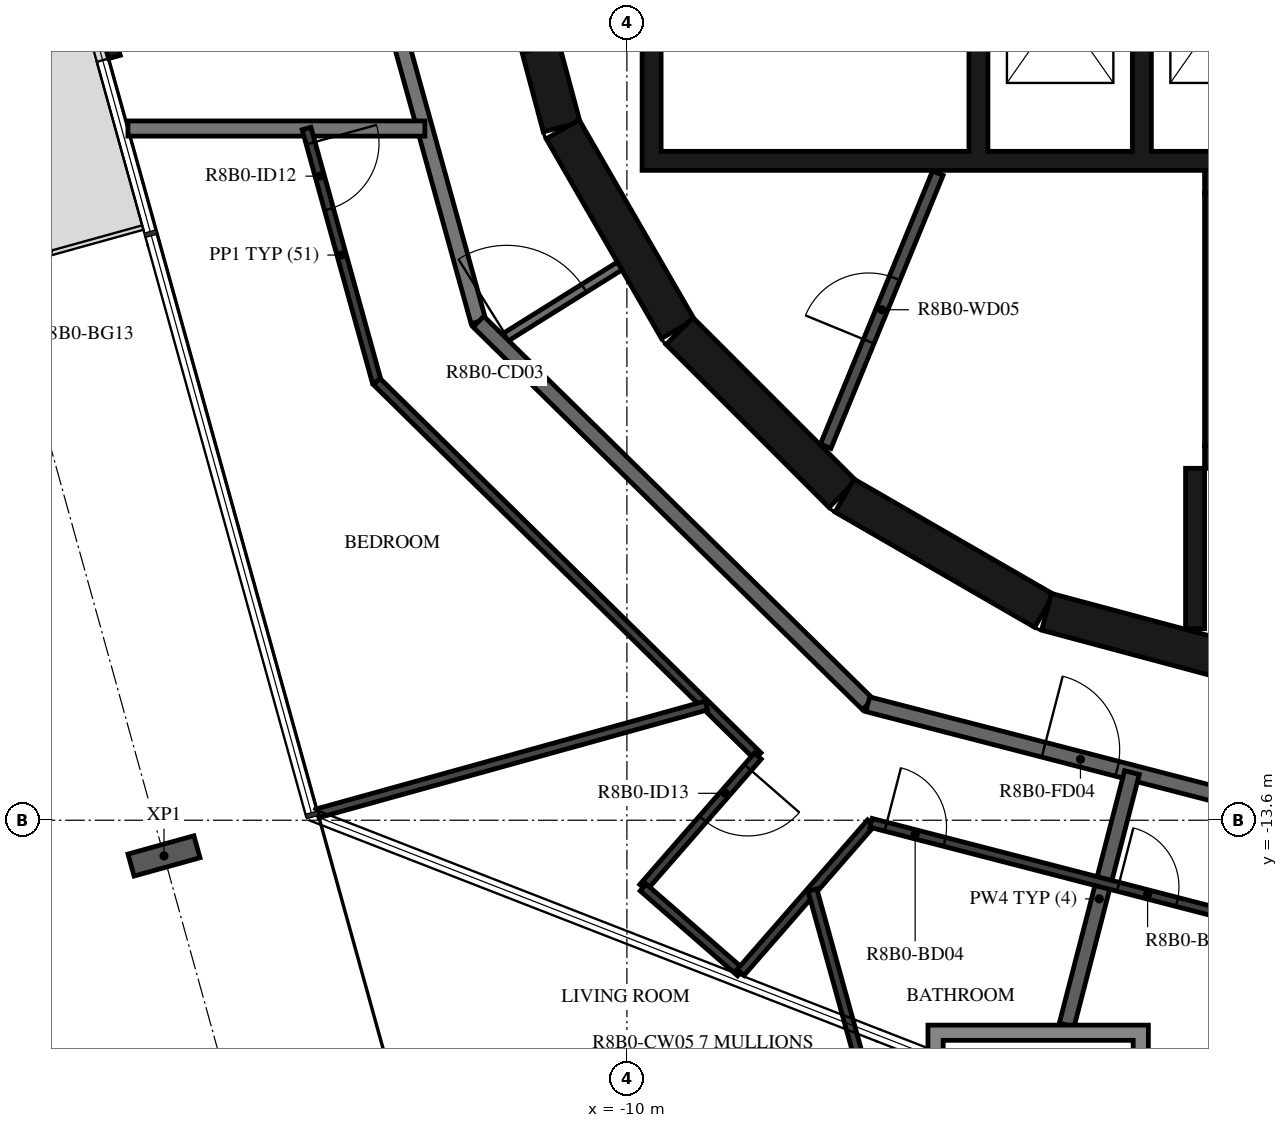
"""IFC4 building model, lengths in metres.
Left out: names, types, materials, properties, quantities, classifications, styles, units other than length and angle.
Written with IfcOpenShell. Run it as: python <this file> out.ifc"""

import sys

from ifc_helpers import new_model, si_unit, direction, frame, frame_2d, origin, origin_2d, place, context, subcontext, project, spatial, polyline, rectangle, i_section, outline, extrude, element, fill, save


model = new_model("IFC4")
c1 = context("Model", 3, precision=1e-05, world=origin(), true_north=direction((0.0, 1.0)))
c2 = subcontext(c1, "Body", "Model", "MODEL_VIEW")
j1 = project(units=[si_unit("LENGTHUNIT", "METRE"), si_unit("PLANEANGLEUNIT", "RADIAN")], contexts=[c1])
p1 = place(None, origin())
s1 = spatial("IfcSite", under=j1, at=p1, CompositionType="ELEMENT")
p2 = place(p1, origin())
s2 = spatial("IfcBuilding", under=s1, at=p2, CompositionType="ELEMENT")
p3 = place(p2, frame((0.0, 0.0, 312.2)))
s3 = spatial("IfcBuildingStorey", under=s2, at=p3, CompositionType="ELEMENT", Elevation=312.2)
p4 = place(p3, frame((-16.09, -14.069, -0.38), z_axis=(0.0, 0.0, 1.0), x_axis=(-0.267238143562, 0.963630517691, 0.0)))
e1 = element("IfcColumn", 1, at=p4, inside=s3, PredefinedType="COLUMN", context=c2, shape_type="SweptSolid", body=[
    extrude(i_section(OverallWidth=0.3, OverallDepth=0.9, WebThickness=0.019, FlangeThickness=0.035, FilletRadius=0.03, at=origin_2d()), origin(), (0.0, 0.0, 1.0), 3.5),
])
p5 = place(p3, frame((-17.598, -0.475, 0.0), z_axis=(0.0, 0.0, 1.0), x_axis=(0.267266077957, -0.963622770369, 0.0)))
e2 = element("IfcWall", 2, at=p5, inside=s3, PredefinedType="STANDARD", context=c2, shape_type="SweptSolid", body=[
    extrude(rectangle(XDim=3.2, YDim=0.16, at=frame_2d((1.6, 0.0))), origin(), (0.0, 0.0, 1.0), 3.12),
])
p6 = place(p5, frame((0.4, 0.0, 0.0)))
e3 = element("IfcOpeningElement", 3, at=p6, cuts=e2, PredefinedType="OPENING", context=c2, shape_type="SweptSolid", body=[
    extrude(rectangle(XDim=2.4, YDim=2.4, at=frame_2d((1.2, 1.2))), frame((0.0, 0.09, 0.0), z_axis=(0.0, -1.0, 0.0), x_axis=(1.0, 0.0, 0.0)), (0.0, 0.0, 1.0), 0.18),
])
p7 = place(p3, frame((-11.643, -1.55, 0.0), z_axis=(0.0, 0.0, 1.0), x_axis=(0.258734743916, -0.965948410781, 0.0)))
e4 = element("IfcWall", 4, at=p7, inside=s3, PredefinedType="SHEAR", context=c2, shape_type="SweptSolid", body=[
    extrude(rectangle(XDim=3.033, YDim=0.5, at=frame_2d((1.516, 0.0))), origin(), (0.0, 0.0, 1.0), 3.12),
])
p8 = place(p7, frame((1.066, 0.0, 0.0)))
e5 = element("IfcOpeningElement", 5, at=p8, cuts=e4, PredefinedType="OPENING", context=c2, shape_type="SweptSolid", body=[
    extrude(rectangle(XDim=0.9, YDim=2.1, at=frame_2d((0.45, 1.05))), frame((0.0, 0.26, 0.0), z_axis=(0.0, -1.0, 0.0), x_axis=(1.0, 0.0, 0.0)), (0.0, 0.0, 1.0), 0.52),
])
p9 = place(p3, frame((-10.845, -4.51, 0.0), z_axis=(0.0, 0.0, 1.0), x_axis=(0.500087131594, -0.865975092491, 0.0)))
e6 = element("IfcWall", 6, at=p9, inside=s3, PredefinedType="SHEAR", context=c2, shape_type="SweptSolid", body=[
    extrude(rectangle(XDim=3.033, YDim=0.5, at=frame_2d((1.516, 0.0))), origin(), (0.0, 0.0, 1.0), 3.12),
])
p10 = place(p3, frame((-9.308, -7.164, 0.0), z_axis=(0.0, 0.0, 1.0), x_axis=(0.707106781187, -0.707106781187, 0.0)))
e7 = element("IfcWall", 7, at=p10, inside=s3, PredefinedType="SHEAR", context=c2, shape_type="SweptSolid", body=[
    extrude(rectangle(XDim=3.032, YDim=0.5, at=frame_2d((1.516, 0.0))), origin(), (0.0, 0.0, 1.0), 3.12),
])
for number, where, z_axis, x_axis in (
    (8, (-7.137, -9.329, 0.0), (0.0, 0.0, 1.0), (0.866, -0.5, 0.0)),
    (9, (-4.479, -10.858, 0.0), (0.0, 0.0, 1.0), (0.966, -0.259, 0.0)),
):
    element("IfcWall", number, at=place(p3, frame(where, z_axis=z_axis, x_axis=x_axis)), inside=s3, PredefinedType="SHEAR", context=c2, shape_type="SweptSolid", body=[
        extrude(rectangle(XDim=3.033, YDim=0.5, at=frame_2d((1.516, 0.0))), origin(), (0.0, 0.0, 1.0), 3.12),
    ])
p11 = place(p3, frame((-2.275, -8.67, 0.0), z_axis=(0.0, 0.0, 1.0), x_axis=(0.0, 1.0, 0.0)))
e10 = element("IfcWall", 10, at=p11, inside=s3, PredefinedType="SHEAR", context=c2, shape_type="SweptSolid", body=[
    extrude(rectangle(XDim=3.32, YDim=0.25, at=frame_2d((1.66, 0.0))), origin(), (0.0, 0.0, 1.0), 3.12),
])
p12 = place(p3, frame((-2.4, -5.2, 0.0), z_axis=(0.0, 0.0, 1.0), x_axis=(1.0, 0.0, 0.0)))
e11 = element("IfcWall", 11, at=p12, inside=s3, PredefinedType="SHEAR", context=c2, shape_type="SweptSolid", body=[
    extrude(rectangle(XDim=7.05, YDim=0.3, at=frame_2d((3.525, 0.0))), origin(), (0.0, 0.0, 1.0), 3.12),
])
p13 = place(p3, frame((-2.4, -8.82, 0.0), z_axis=(0.0, 0.0, 1.0), x_axis=(1.0, 0.0, 0.0)))
e12 = element("IfcWall", 12, at=p13, inside=s3, PredefinedType="SHEAR", context=c2, shape_type="SweptSolid", body=[
    extrude(rectangle(XDim=2.5, YDim=0.3, at=frame_2d((1.25, 0.0))), origin(), (0.0, 0.0, 1.0), 3.12),
])
p14 = place(p13, frame((0.65, 0.0, 0.0)))
e13 = element("IfcOpeningElement", 13, at=p14, cuts=e12, PredefinedType="OPENING", context=c2, shape_type="SweptSolid", body=[
    extrude(rectangle(XDim=1.2, YDim=2.1, at=frame_2d((0.6, 1.05))), frame((0.0, 0.16, 0.0), z_axis=(0.0, -1.0, 0.0), x_axis=(1.0, 0.0, 0.0)), (0.0, 0.0, 1.0), 0.32),
])
p15 = place(p3, frame((-2.525, -8.97, 0.0), z_axis=(0.0, 0.0, 1.0), x_axis=(0.0, -1.0, 0.0)))
e14 = element("IfcWall", 14, at=p15, inside=s3, PredefinedType="SHEAR", context=c2, shape_type="SweptSolid", body=[
    extrude(rectangle(XDim=2.11, YDim=0.25, at=frame_2d((1.055, 0.0))), origin(), (0.0, 0.0, 1.0), 3.12),
])
p16 = place(p3, origin())
e15 = element("IfcWall", 15, at=p16, inside=s3, PredefinedType="SHEAR", context=c2, shape_type="SweptSolid", body=[
    extrude(outline(polyline([(9.8, -5.05), (9.8, -4.8), (9.8, -1.9), (9.55, -1.9), (9.55, -4.8), (7.65, -4.8), (7.65, -1.9), (7.4, -1.9), (7.4, -4.8), (5.5, -4.8), (5.5, -1.9), (5.25, -1.9), (5.25, -4.8), (3.35, -4.8), (3.35, -1.9), (3.1, -1.9), (3.1, -4.8), (1.2, -4.8), (1.2, -1.9), (0.95, -1.9), (0.95, -4.8), (-0.95, -4.8), (-0.95, -1.9), (-1.2, -1.9), (-1.2, -4.8), (-3.1, -4.8), (-3.1, -1.9), (-3.35, -1.9), (-3.35, -4.8), (-5.25, -4.8), (-5.25, -1.9), (-5.5, -1.9), (-5.5, -4.8), (-9.55, -4.8), (-9.55, -1.9), (-9.8, -1.9), (-9.8, -4.8), (-9.8, -5.05), (9.8, -5.05)])), origin(), (0.0, 0.0, 1.0), 3.12),
])
p17 = place(p3, frame((-7.385, -8.681, 0.0), z_axis=(0.0, 0.0, 1.0), x_axis=(0.379804590409, 0.925066739811, 0.0)))
e16 = element("IfcWall", 16, at=p17, inside=s3, PredefinedType="PARTITIONING", context=c2, shape_type="SweptSolid", body=[
    extrude(rectangle(XDim=3.885, YDim=0.15, at=frame_2d((1.942, 0.0))), origin(), (0.0, 0.0, 1.0), 3.12),
])
p18 = place(p17, frame((1.493, 0.0, 0.0)))
e17 = element("IfcOpeningElement", 17, at=p18, cuts=e16, PredefinedType="OPENING", context=c2, shape_type="SweptSolid", body=[
    extrude(rectangle(XDim=0.9, YDim=2.1, at=frame_2d((0.45, 1.05))), frame((0.0, 0.085, 0.0), z_axis=(0.0, -1.0, 0.0), x_axis=(1.0, 0.0, 0.0)), (0.0, 0.0, 1.0), 0.17),
])
p19 = place(p3, frame((-11.687, -7.303, 0.0), z_axis=(0.0, 0.0, 1.0), x_axis=(0.848064094072, 0.529893661357, 0.0)))
e18 = element("IfcWall", 18, at=p19, inside=s3, PredefinedType="PARTITIONING", context=c2, shape_type="SweptSolid", body=[
    extrude(rectangle(XDim=1.876, YDim=0.12, at=frame_2d((0.938, 0.0))), origin(), (0.0, 0.0, 1.0), 3.12),
])
p20 = place(p19, frame((0.125, 0.0, 0.0)))
e19 = element("IfcOpeningElement", 19, at=p20, cuts=e18, PredefinedType="OPENING", context=c2, shape_type="SweptSolid", body=[
    extrude(rectangle(XDim=1.2, YDim=2.1, at=frame_2d((0.6, 1.05))), frame((0.0, 0.07, 0.0), z_axis=(0.0, -1.0, 0.0), x_axis=(1.0, 0.0, 0.0)), (0.0, 0.0, 1.0), 0.14),
])
p21 = place(p3, frame((-13.872, -0.121, 0.0), z_axis=(0.0, 0.0, 1.0), x_axis=(0.267254575108, -0.963625960674, 0.0)))
e20 = element("IfcWall", 20, at=p21, inside=s3, PredefinedType="STANDARD", context=c2, shape_type="SweptSolid", body=[
    extrude(rectangle(XDim=7.181, YDim=0.2, at=frame_2d((3.591, 0.0))), origin(), (0.0, 0.0, 1.0), 3.12),
])
p22 = place(p3, frame((-11.953, -7.041, 0.0), z_axis=(0.0, 0.0, 1.0), x_axis=(0.713250549143, -0.70090916255, 0.0)))
e21 = element("IfcWall", 21, at=p22, inside=s3, PredefinedType="STANDARD", context=c2, shape_type="SweptSolid", body=[
    extrude(rectangle(XDim=7.181, YDim=0.2, at=frame_2d((3.59, 0.0))), origin(), (0.0, 0.0, 1.0), 3.12),
])
p23 = place(p3, frame((-6.831, -12.074, 0.0), z_axis=(0.0, 0.0, 1.0), x_axis=(0.968144780225, -0.250391063186, 0.0)))
e22 = element("IfcWall", 22, at=p23, inside=s3, PredefinedType="STANDARD", context=c2, shape_type="SweptSolid", body=[
    extrude(rectangle(XDim=7.181, YDim=0.2, at=frame_2d((3.591, 0.0))), origin(), (0.0, 0.0, 1.0), 3.12),
])
p24 = place(p23, frame((2.39, 0.0, 0.0)))
e23 = element("IfcOpeningElement", 23, at=p24, cuts=e22, PredefinedType="OPENING", context=c2, shape_type="SweptSolid", body=[
    extrude(rectangle(XDim=1.0, YDim=2.1, at=frame_2d((0.5, 1.05))), frame((0.0, 0.11, 0.0), z_axis=(0.0, -1.0, 0.0), x_axis=(1.0, 0.0, 0.0)), (0.0, 0.0, 1.0), 0.22),
])
p25 = place(p23, frame((5.69, 0.0, 0.0)))
e24 = element("IfcOpeningElement", 24, at=p25, cuts=e22, PredefinedType="OPENING", context=c2, shape_type="SweptSolid", body=[
    extrude(rectangle(XDim=1.0, YDim=2.1, at=frame_2d((0.5, 1.05))), frame((0.0, 0.11, 0.0), z_axis=(0.0, -1.0, 0.0), x_axis=(1.0, 0.0, 0.0)), (0.0, 0.0, 1.0), 0.22),
])
p26 = place(p3, frame((-16.564, -4.5, 0.0), z_axis=(0.0, 0.0, 1.0), x_axis=(1.0, 0.0, 0.0)))
e25 = element("IfcWall", 25, at=p26, inside=s3, PredefinedType="STANDARD", context=c2, shape_type="SweptSolid", body=[
    extrude(rectangle(XDim=3.907, YDim=0.2, at=frame_2d((1.953, 0.0))), origin(), (0.0, 0.0, 1.0), 3.12),
])
p27 = place(p3, frame((-4.214, -16.295, 0.0), z_axis=(0.0, 0.0, 1.0), x_axis=(0.250428810918, 0.968135016752, 0.0)))
e26 = element("IfcWall", 26, at=p27, inside=s3, PredefinedType="STANDARD", context=c2, shape_type="SweptSolid", body=[
    extrude(rectangle(XDim=3.432, YDim=0.2, at=frame_2d((1.716, 0.0))), origin(), (0.0, 0.0, 1.0), 3.12),
])
p28 = place(p3, frame((-14.214, -4.5, 0.0), z_axis=(0.0, 0.0, 1.0), x_axis=(0.267199167841, -0.963641325756, 0.0)))
e27 = element("IfcWall", 27, at=p28, inside=s3, PredefinedType="PARTITIONING", context=c2, shape_type="SweptSolid", body=[
    extrude(rectangle(XDim=3.455, YDim=0.12, at=frame_2d((1.727, 0.0))), origin(), (0.0, 0.0, 1.0), 3.12),
])
p29 = place(p28, frame((0.2, 0.0, 0.0)))
e28 = element("IfcOpeningElement", 28, at=p29, cuts=e27, PredefinedType="OPENING", context=c2, shape_type="SweptSolid", body=[
    extrude(rectangle(XDim=0.9, YDim=2.1, at=frame_2d((0.45, 1.05))), frame((0.0, 0.07, 0.0), z_axis=(0.0, -1.0, 0.0), x_axis=(1.0, 0.0, 0.0)), (0.0, 0.0, 1.0), 0.14),
])
p30 = place(p3, frame((-13.291, -7.829, 0.0), z_axis=(0.0, 0.0, 1.0), x_axis=(0.71326209988, -0.700897408238, 0.0)))
e29 = element("IfcWall", 29, at=p30, inside=s3, PredefinedType="PARTITIONING", context=c2, shape_type="SweptSolid", body=[
    extrude(rectangle(XDim=7.029, YDim=0.12, at=frame_2d((3.515, 0.0))), origin(), (0.0, 0.0, 1.0), 3.12),
])
p31 = place(p3, frame((-8.278, -12.756, 0.0), z_axis=(0.0, 0.0, 1.0), x_axis=(-0.657358463875, -0.753578031774, 0.0)))
e30 = element("IfcWall", 30, at=p31, inside=s3, PredefinedType="PARTITIONING", context=c2, shape_type="SweptSolid", body=[
    extrude(rectangle(XDim=2.294, YDim=0.12, at=frame_2d((1.147, 0.0))), origin(), (0.0, 0.0, 1.0), 3.12),
])
p32 = place(p31, frame((0.2, 0.0, 0.0)))
e31 = element("IfcOpeningElement", 31, at=p32, cuts=e30, PredefinedType="OPENING", context=c2, shape_type="SweptSolid", body=[
    extrude(rectangle(XDim=0.9, YDim=2.1, at=frame_2d((0.45, 1.05))), frame((0.0, 0.07, 0.0), z_axis=(0.0, -1.0, 0.0), x_axis=(1.0, 0.0, 0.0)), (0.0, 0.0, 1.0), 0.14),
])
p33 = place(p3, frame((-9.785, -14.484, 0.0), z_axis=(0.0, 0.0, 1.0), x_axis=(0.753643217927, -0.657283728745, 0.0)))
e32 = element("IfcWall", 32, at=p33, inside=s3, PredefinedType="PARTITIONING", context=c2, shape_type="SweptSolid", body=[
    extrude(rectangle(XDim=1.7, YDim=0.12, at=frame_2d((0.85, 0.0))), origin(), (0.0, 0.0, 1.0), 3.12),
])
p34 = place(p3, frame((-8.504, -15.602, 0.0), z_axis=(0.0, 0.0, 1.0), x_axis=(0.657298689015, 0.753630170189, 0.0)))
e33 = element("IfcWall", 33, at=p34, inside=s3, PredefinedType="PARTITIONING", context=c2, shape_type="SweptSolid", body=[
    extrude(rectangle(XDim=2.61, YDim=0.12, at=frame_2d((1.305, 0.0))), origin(), (0.0, 0.0, 1.0), 3.12),
])
p35 = place(p3, frame((-6.788, -13.635, 0.0), z_axis=(0.0, 0.0, 1.0), x_axis=(0.968142345176, -0.250400478189, 0.0)))
e34 = element("IfcWall", 34, at=p35, inside=s3, PredefinedType="PARTITIONING", context=c2, shape_type="SweptSolid", body=[
    extrude(rectangle(XDim=7.151, YDim=0.12, at=frame_2d((3.575, 0.0))), origin(), (0.0, 0.0, 1.0), 3.12),
])
p36 = place(p35, frame((0.2, 0.0, 0.0)))
e35 = element("IfcOpeningElement", 35, at=p36, cuts=e34, PredefinedType="OPENING", context=c2, shape_type="SweptSolid", body=[
    extrude(rectangle(XDim=0.8, YDim=2.1, at=frame_2d((0.4, 1.05))), frame((0.0, 0.07, 0.0), z_axis=(0.0, -1.0, 0.0), x_axis=(1.0, 0.0, 0.0)), (0.0, 0.0, 1.0), 0.14),
])
p37 = place(p35, frame((3.358, 0.0, 0.0)))
e36 = element("IfcOpeningElement", 36, at=p37, cuts=e34, PredefinedType="OPENING", context=c2, shape_type="SweptSolid", body=[
    extrude(rectangle(XDim=0.8, YDim=2.1, at=frame_2d((0.4, 1.05))), frame((0.0, 0.07, 0.0), z_axis=(0.0, -1.0, 0.0), x_axis=(1.0, 0.0, 0.0)), (0.0, 0.0, 1.0), 0.14),
])
p38 = place(p3, frame((-14.066, -13.508, 0.0), z_axis=(0.0, 0.0, 1.0), x_axis=(0.963634530082, 0.267223674913, 0.0)))
e37 = element("IfcWall", 37, at=p38, inside=s3, PredefinedType="PARTITIONING", context=c2, shape_type="SweptSolid", body=[
    extrude(rectangle(XDim=5.304, YDim=0.12, at=frame_2d((2.652, 0.0))), origin(), (0.0, 0.0, 1.0), 2.73),
])
p39 = place(p3, frame((-6.61, -17.943, 0.0), z_axis=(0.0, 0.0, 1.0), x_axis=(-0.267254066434, 0.96362610175, 0.0)))
e38 = element("IfcWall", 38, at=p39, inside=s3, PredefinedType="PARTITIONING", context=c2, shape_type="SweptSolid", body=[
    extrude(rectangle(XDim=3.553, YDim=0.12, at=frame_2d((1.777, 0.0))), origin(), (0.0, 0.0, 1.0), 3.12),
])
p40 = place(p3, frame((-2.918, -18.898, 0.0), z_axis=(0.0, 0.0, 1.0), x_axis=(0.700881606707, 0.713277627141, 0.0)))
e39 = element("IfcWall", 39, at=p40, inside=s3, PredefinedType="PARTITIONING", context=c2, shape_type="SweptSolid", body=[
    extrude(rectangle(XDim=5.062, YDim=0.12, at=frame_2d((2.531, 0.0))), origin(), (0.0, 0.0, 1.0), 3.12),
])
p41 = place(p3, origin())
e40 = element("IfcWall", 40, at=p41, inside=s3, PredefinedType="STANDARD", context=c2, shape_type="SweptSolid", body=[
    extrude(outline(polyline([(-3.139, -16.295), (-3.139, -19.195), (-6.039, -19.195), (-6.039, -16.295), (-3.139, -16.295)]), holes=[polyline([(-5.839, -18.995), (-3.339, -18.995), (-3.339, -16.495), (-5.839, -16.495), (-5.839, -18.995)])]), origin(), (0.0, 0.0, 1.0), 3.12),
])
p42 = place(p18, origin())
e41 = element("IfcDoor", 41, at=p42, inside=s3, OperationType="SINGLE_SWING_LEFT", PredefinedType="DOOR", context=c2, shape_type="SweptSolid", body=[
    extrude(rectangle(XDim=0.9, YDim=2.1, at=frame_2d((0.45, 1.05))), frame((0.0, 0.025, 0.0), z_axis=(0.0, -1.0, 0.0), x_axis=(1.0, 0.0, 0.0)), (0.0, 0.0, 1.0), 0.05),
])
fill(e17, e41)
p43 = place(p24, origin())
e42 = element("IfcDoor", 42, at=p43, inside=s3, OperationType="SINGLE_SWING_RIGHT", PredefinedType="DOOR", context=c2, shape_type="SweptSolid", body=[
    extrude(rectangle(XDim=1.0, YDim=2.1, at=frame_2d((0.5, 1.05))), frame((0.0, 0.025, 0.0), z_axis=(0.0, -1.0, 0.0), x_axis=(1.0, 0.0, 0.0)), (0.0, 0.0, 1.0), 0.05),
])
fill(e23, e42)
p44 = place(p29, origin())
e43 = element("IfcDoor", 43, at=p44, inside=s3, OperationType="SINGLE_SWING_RIGHT", PredefinedType="DOOR", context=c2, shape_type="SweptSolid", body=[
    extrude(rectangle(XDim=0.9, YDim=2.1, at=frame_2d((0.45, 1.05))), frame((0.0, 0.025, 0.0), z_axis=(0.0, -1.0, 0.0), x_axis=(1.0, 0.0, 0.0)), (0.0, 0.0, 1.0), 0.05),
])
fill(e28, e43)
p45 = place(p32, origin())
e44 = element("IfcDoor", 44, at=p45, inside=s3, OperationType="SINGLE_SWING_RIGHT", PredefinedType="DOOR", context=c2, shape_type="SweptSolid", body=[
    extrude(rectangle(XDim=0.9, YDim=2.1, at=frame_2d((0.45, 1.05))), frame((0.0, 0.025, 0.0), z_axis=(0.0, -1.0, 0.0), x_axis=(1.0, 0.0, 0.0)), (0.0, 0.0, 1.0), 0.05),
])
fill(e31, e44)
p46 = place(p36, origin())
e45 = element("IfcDoor", 45, at=p46, inside=s3, OperationType="SINGLE_SWING_RIGHT", PredefinedType="DOOR", context=c2, shape_type="SweptSolid", body=[
    extrude(rectangle(XDim=0.8, YDim=2.1, at=frame_2d((0.4, 1.05))), frame((0.0, 0.025, 0.0), z_axis=(0.0, -1.0, 0.0), x_axis=(1.0, 0.0, 0.0)), (0.0, 0.0, 1.0), 0.05),
])
fill(e35, e45)
p47 = place(p37, origin())
e46 = element("IfcDoor", 46, at=p47, inside=s3, OperationType="SINGLE_SWING_RIGHT", PredefinedType="DOOR", context=c2, shape_type="SweptSolid", body=[
    extrude(rectangle(XDim=0.8, YDim=2.1, at=frame_2d((0.4, 1.05))), frame((0.0, 0.025, 0.0), z_axis=(0.0, -1.0, 0.0), x_axis=(1.0, 0.0, 0.0)), (0.0, 0.0, 1.0), 0.05),
])
fill(e36, e46)
p48 = place(p20, origin())
e47 = element("IfcDoor", 47, at=p48, inside=s3, OperationType="DOUBLE_DOOR_SINGLE_SWING", PredefinedType="DOOR", context=c2, shape_type="SweptSolid", body=[
    extrude(rectangle(XDim=1.2, YDim=2.1, at=frame_2d((0.6, 1.05))), frame((0.0, 0.025, 0.0), z_axis=(0.0, -1.0, 0.0), x_axis=(1.0, 0.0, 0.0)), (0.0, 0.0, 1.0), 0.05),
])
fill(e19, e47)
save(model, sys.argv[1])
